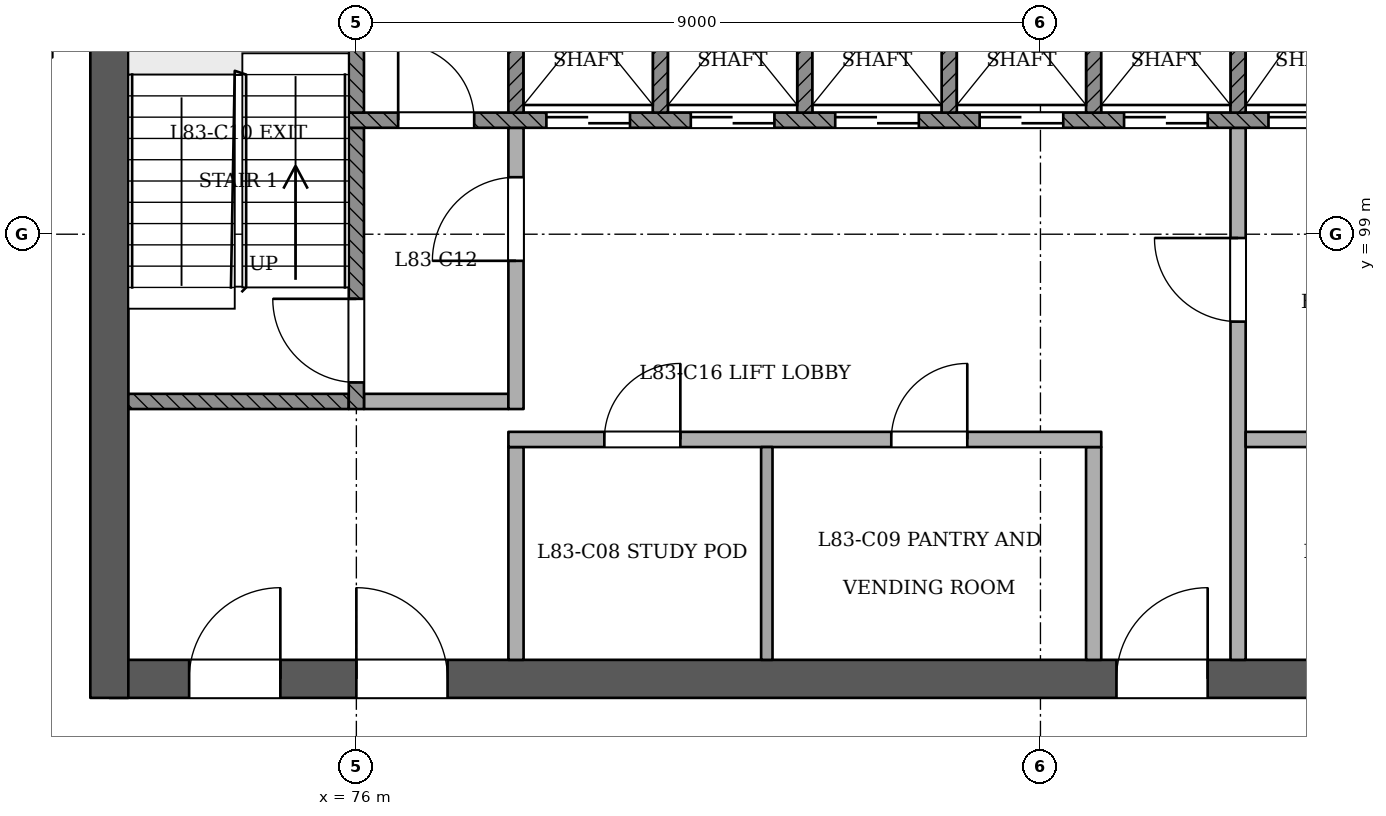
"""IFC4 building model, lengths in metres.
Left out: names, types, materials, properties, quantities, classifications, styles, units other than length and angle.
Written with IfcOpenShell. Run it as: python <this file> out.ifc"""

import sys

from ifc_helpers import new_model, si_unit, direction, frame, frame_2d, origin, place, context, subcontext, project, spatial, rectangle, extrude, element, fill, save


model = new_model("IFC4")
c1 = context("Model", 3, precision=1e-05, world=origin(), true_north=direction((0.0, 1.0)))
c2 = subcontext(c1, "Body", "Model", "MODEL_VIEW")
j1 = project(units=[si_unit("LENGTHUNIT", "METRE"), si_unit("PLANEANGLEUNIT", "RADIAN")], contexts=[c1])
p1 = place(None, origin())
s1 = spatial("IfcSite", under=j1, at=p1, CompositionType="ELEMENT")
p2 = place(p1, origin())
s2 = spatial("IfcBuilding", under=s1, at=p2, CompositionType="ELEMENT")
p3 = place(p2, frame((0.0, 0.0, 320.2)))
s3 = spatial("IfcBuildingStorey", under=s2, at=p3, CompositionType="ELEMENT", Elevation=320.2)
p4 = place(p3, frame((72.75, 93.15, 0.0), z_axis=(0.0, 0.0, 1.0), x_axis=(1.0, 0.0, 0.0)))
e1 = element("IfcWall", 1, at=p4, inside=s3, PredefinedType="SHEAR", context=c2, shape_type="SweptSolid", body=[
    extrude(rectangle(XDim=24.75, YDim=0.5, at=frame_2d((12.375, 0.0))), origin(), (0.0, 0.0, 1.0), 3.6),
])
p5 = place(p4, frame((1.05, 0.0, 0.0)))
e2 = element("IfcOpeningElement", 2, at=p5, cuts=e1, PredefinedType="OPENING", context=c2, shape_type="SweptSolid", body=[
    extrude(rectangle(XDim=1.2, YDim=2.1, at=frame_2d((0.6, 1.05))), frame((0.0, 0.26, 0.0), z_axis=(0.0, -1.0, 0.0), x_axis=(1.0, 0.0, 0.0)), (0.0, 0.0, 1.0), 0.521),
])
p6 = place(p4, frame((3.25, 0.0, 0.0)))
e3 = element("IfcOpeningElement", 3, at=p6, cuts=e1, PredefinedType="OPENING", context=c2, shape_type="SweptSolid", body=[
    extrude(rectangle(XDim=1.2, YDim=2.1, at=frame_2d((0.6, 1.05))), frame((0.0, 0.26, 0.0), z_axis=(0.0, -1.0, 0.0), x_axis=(1.0, 0.0, 0.0)), (0.0, 0.0, 1.0), 0.521),
])
p7 = place(p4, frame((13.25, 0.0, 0.0)))
e4 = element("IfcOpeningElement", 4, at=p7, cuts=e1, PredefinedType="OPENING", context=c2, shape_type="SweptSolid", body=[
    extrude(rectangle(XDim=1.2, YDim=2.1, at=frame_2d((0.6, 1.05))), frame((0.0, 0.26, 0.0), z_axis=(0.0, -1.0, 0.0), x_axis=(1.0, 0.0, 0.0)), (0.0, 0.0, 1.0), 0.521),
])
p8 = place(p4, frame((16.663, 0.0, 0.0)))
e5 = element("IfcOpeningElement", 5, at=p8, cuts=e1, PredefinedType="OPENING", context=c2, shape_type="SweptSolid", body=[
    extrude(rectangle(XDim=1.0, YDim=2.1, at=frame_2d((0.5, 1.05))), frame((0.0, 0.26, 0.0), z_axis=(0.0, -1.0, 0.0), x_axis=(1.0, 0.0, 0.0)), (0.0, 0.0, 1.0), 0.521),
])
p9 = place(p4, frame((20.55, 0.0, 0.0)))
e6 = element("IfcOpeningElement", 6, at=p9, cuts=e1, PredefinedType="OPENING", context=c2, shape_type="SweptSolid", body=[
    extrude(rectangle(XDim=1.0, YDim=2.1, at=frame_2d((0.5, 1.05))), frame((0.0, 0.26, 0.0), z_axis=(0.0, -1.0, 0.0), x_axis=(1.0, 0.0, 0.0)), (0.0, 0.0, 1.0), 0.521),
])
p10 = place(p4, frame((22.988, 0.0, 0.0)))
e7 = element("IfcOpeningElement", 7, at=p10, cuts=e1, PredefinedType="OPENING", context=c2, shape_type="SweptSolid", body=[
    extrude(rectangle(XDim=1.0, YDim=2.1, at=frame_2d((0.5, 1.05))), frame((0.0, 0.26, 0.0), z_axis=(0.0, -1.0, 0.0), x_axis=(1.0, 0.0, 0.0)), (0.0, 0.0, 1.0), 0.521),
])
p11 = place(p3, frame((72.75, 103.65, 0.0), z_axis=(0.0, 0.0, 1.0), x_axis=(0.0, -1.0, 0.0)))
e8 = element("IfcWall", 8, at=p11, inside=s3, PredefinedType="SHEAR", context=c2, shape_type="SweptSolid", body=[
    extrude(rectangle(XDim=10.75, YDim=0.5, at=frame_2d((5.375, 0.0))), origin(), (0.0, 0.0, 1.0), 3.6),
])
p12 = place(p3, frame((78.1, 93.4, 0.0), z_axis=(0.0, 0.0, 1.0), x_axis=(0.0, 1.0, 0.0)))
e9 = element("IfcWall", 9, at=p12, inside=s3, PredefinedType="PARTITIONING", context=c2, shape_type="SweptSolid", body=[
    extrude(rectangle(XDim=2.8, YDim=0.2, at=frame_2d((1.4, 0.0))), origin(), (0.0, 0.0, 1.0), 3.2),
])
p13 = place(p3, frame((81.4, 93.4, 0.0), z_axis=(0.0, 0.0, 1.0), x_axis=(0.0, 1.0, 0.0)))
e10 = element("IfcWall", 10, at=p13, inside=s3, PredefinedType="PARTITIONING", context=c2, shape_type="SweptSolid", body=[
    extrude(rectangle(XDim=2.8, YDim=0.15, at=frame_2d((1.4, 0.0))), origin(), (0.0, 0.0, 1.0), 3.2),
])
p14 = place(p3, frame((85.7, 93.4, 0.0), z_axis=(0.0, 0.0, 1.0), x_axis=(0.0, 1.0, 0.0)))
e11 = element("IfcWall", 11, at=p14, inside=s3, PredefinedType="PARTITIONING", context=c2, shape_type="SweptSolid", body=[
    extrude(rectangle(XDim=2.8, YDim=0.2, at=frame_2d((1.4, 0.0))), origin(), (0.0, 0.0, 1.0), 3.2),
])
p15 = place(p3, frame((87.6, 93.4, 0.0), z_axis=(0.0, 0.0, 1.0), x_axis=(0.0, 1.0, 0.0)))
e12 = element("IfcWall", 12, at=p15, inside=s3, PredefinedType="PARTITIONING", context=c2, shape_type="SweptSolid", body=[
    extrude(rectangle(XDim=7.0, YDim=0.2, at=frame_2d((3.5, 0.0))), origin(), (0.0, 0.0, 1.0), 3.2),
])
p16 = place(p15, frame((4.45, 0.0, 0.0)))
e13 = element("IfcOpeningElement", 13, at=p16, cuts=e12, PredefinedType="OPENING", context=c2, shape_type="SweptSolid", body=[
    extrude(rectangle(XDim=1.1, YDim=2.1, at=frame_2d((0.55, 1.05))), frame((0.0, 0.11, 0.0), z_axis=(0.0, -1.0, 0.0), x_axis=(1.0, 0.0, 0.0)), (0.0, 0.0, 1.0), 0.221),
])
p17 = place(p3, frame((78.0, 96.3, 0.0), z_axis=(0.0, 0.0, 1.0), x_axis=(1.0, 0.0, 0.0)))
e14 = element("IfcWall", 14, at=p17, inside=s3, PredefinedType="PARTITIONING", context=c2, shape_type="SweptSolid", body=[
    extrude(rectangle(XDim=7.8, YDim=0.2, at=frame_2d((3.9, 0.0))), origin(), (0.0, 0.0, 1.0), 3.2),
])
p18 = place(p17, frame((1.262, 0.0, 0.0)))
e15 = element("IfcOpeningElement", 15, at=p18, cuts=e14, PredefinedType="OPENING", context=c2, shape_type="SweptSolid", body=[
    extrude(rectangle(XDim=1.0, YDim=2.1, at=frame_2d((0.5, 1.05))), frame((0.0, 0.11, 0.0), z_axis=(0.0, -1.0, 0.0), x_axis=(1.0, 0.0, 0.0)), (0.0, 0.0, 1.0), 0.221),
])
p19 = place(p17, frame((5.038, 0.0, 0.0)))
e16 = element("IfcOpeningElement", 16, at=p19, cuts=e14, PredefinedType="OPENING", context=c2, shape_type="SweptSolid", body=[
    extrude(rectangle(XDim=1.0, YDim=2.1, at=frame_2d((0.5, 1.05))), frame((0.0, 0.11, 0.0), z_axis=(0.0, -1.0, 0.0), x_axis=(1.0, 0.0, 0.0)), (0.0, 0.0, 1.0), 0.221),
])
p20 = place(p3, frame((87.7, 96.3, 0.0), z_axis=(0.0, 0.0, 1.0), x_axis=(1.0, 0.0, 0.0)))
e17 = element("IfcWall", 17, at=p20, inside=s3, PredefinedType="PARTITIONING", context=c2, shape_type="SweptSolid", body=[
    extrude(rectangle(XDim=3.6, YDim=0.2, at=frame_2d((1.8, 0.0))), origin(), (0.0, 0.0, 1.0), 3.2),
])
p21 = place(p3, frame((73.0, 96.8, 0.0), z_axis=(0.0, 0.0, 1.0), x_axis=(1.0, 0.0, 0.0)))
e18 = element("IfcWall", 18, at=p21, inside=s3, PredefinedType="SOLIDWALL", context=c2, shape_type="SweptSolid", body=[
    extrude(rectangle(XDim=2.9, YDim=0.2, at=frame_2d((1.45, 0.0))), origin(), (0.0, 0.0, 1.0), 3.2),
])
p22 = place(p3, frame((76.0, 96.7, 0.0), z_axis=(0.0, 0.0, 1.0), x_axis=(0.0, 1.0, 0.0)))
e19 = element("IfcWall", 19, at=p22, inside=s3, PredefinedType="SOLIDWALL", context=c2, shape_type="SweptSolid", body=[
    extrude(rectangle(XDim=3.7, YDim=0.2, at=frame_2d((1.85, 0.0))), origin(), (0.0, 0.0, 1.0), 3.2),
])
p23 = place(p22, frame((0.35, 0.0, 0.0)))
e20 = element("IfcOpeningElement", 20, at=p23, cuts=e19, PredefinedType="OPENING", context=c2, shape_type="SweptSolid", body=[
    extrude(rectangle(XDim=1.1, YDim=2.1, at=frame_2d((0.55, 1.05))), frame((0.0, 0.11, 0.0), z_axis=(0.0, -1.0, 0.0), x_axis=(1.0, 0.0, 0.0)), (0.0, 0.0, 1.0), 0.221),
])
p24 = place(p3, frame((76.1, 96.8, 0.0), z_axis=(0.0, 0.0, 1.0), x_axis=(1.0, 0.0, 0.0)))
e21 = element("IfcWall", 21, at=p24, inside=s3, PredefinedType="PARTITIONING", context=c2, shape_type="SweptSolid", body=[
    extrude(rectangle(XDim=1.9, YDim=0.2, at=frame_2d((0.95, 0.0))), origin(), (0.0, 0.0, 1.0), 3.2),
])
p25 = place(p3, frame((78.1, 96.7, 0.0), z_axis=(0.0, 0.0, 1.0), x_axis=(0.0, 1.0, 0.0)))
e22 = element("IfcWall", 22, at=p25, inside=s3, PredefinedType="PARTITIONING", context=c2, shape_type="SweptSolid", body=[
    extrude(rectangle(XDim=3.7, YDim=0.2, at=frame_2d((1.85, 0.0))), origin(), (0.0, 0.0, 1.0), 3.2),
])
p26 = place(p25, frame((1.95, 0.0, 0.0)))
e23 = element("IfcOpeningElement", 23, at=p26, cuts=e22, PredefinedType="OPENING", context=c2, shape_type="SweptSolid", body=[
    extrude(rectangle(XDim=1.1, YDim=2.1, at=frame_2d((0.55, 1.05))), frame((0.0, 0.11, 0.0), z_axis=(0.0, -1.0, 0.0), x_axis=(1.0, 0.0, 0.0)), (0.0, 0.0, 1.0), 0.221),
])
p27 = place(p3, frame((75.9, 100.5, 0.0), z_axis=(0.0, 0.0, 1.0), x_axis=(1.0, 0.0, 0.0)))
e24 = element("IfcWall", 24, at=p27, inside=s3, PredefinedType="SOLIDWALL", context=c2, shape_type="SweptSolid", body=[
    extrude(rectangle(XDim=18.2, YDim=0.2, at=frame_2d((9.1, 0.0))), origin(), (0.0, 0.0, 1.0), 3.2),
])
p28 = place(p27, frame((2.6, 0.0, 0.0)))
e25 = element("IfcOpeningElement", 25, at=p28, cuts=e24, PredefinedType="OPENING", context=c2, shape_type="SweptSolid", body=[
    extrude(rectangle(XDim=1.1, YDim=2.1, at=frame_2d((0.55, 1.05))), frame((0.0, 0.11, 0.0), z_axis=(0.0, -1.0, 0.0), x_axis=(1.0, 0.0, 0.0)), (0.0, 0.0, 1.0), 0.221),
])
p29 = place(p27, frame((4.5, 0.0, 0.0)))
e26 = element("IfcOpeningElement", 26, at=p29, cuts=e24, PredefinedType="OPENING", context=c2, shape_type="SweptSolid", body=[
    extrude(rectangle(XDim=1.1, YDim=2.1, at=frame_2d((0.55, 1.05))), frame((0.0, 0.11, 0.0), z_axis=(0.0, -1.0, 0.0), x_axis=(1.0, 0.0, 0.0)), (0.0, 0.0, 1.0), 0.221),
])
p30 = place(p27, frame((6.4, 0.0, 0.0)))
e27 = element("IfcOpeningElement", 27, at=p30, cuts=e24, PredefinedType="OPENING", context=c2, shape_type="SweptSolid", body=[
    extrude(rectangle(XDim=1.1, YDim=2.1, at=frame_2d((0.55, 1.05))), frame((0.0, 0.11, 0.0), z_axis=(0.0, -1.0, 0.0), x_axis=(1.0, 0.0, 0.0)), (0.0, 0.0, 1.0), 0.221),
])
p31 = place(p27, frame((8.3, 0.0, 0.0)))
e28 = element("IfcOpeningElement", 28, at=p31, cuts=e24, PredefinedType="OPENING", context=c2, shape_type="SweptSolid", body=[
    extrude(rectangle(XDim=1.1, YDim=2.1, at=frame_2d((0.55, 1.05))), frame((0.0, 0.11, 0.0), z_axis=(0.0, -1.0, 0.0), x_axis=(1.0, 0.0, 0.0)), (0.0, 0.0, 1.0), 0.221),
])
p32 = place(p27, frame((10.2, 0.0, 0.0)))
e29 = element("IfcOpeningElement", 29, at=p32, cuts=e24, PredefinedType="OPENING", context=c2, shape_type="SweptSolid", body=[
    extrude(rectangle(XDim=1.1, YDim=2.1, at=frame_2d((0.55, 1.05))), frame((0.0, 0.11, 0.0), z_axis=(0.0, -1.0, 0.0), x_axis=(1.0, 0.0, 0.0)), (0.0, 0.0, 1.0), 0.221),
])
p33 = place(p27, frame((12.1, 0.0, 0.0)))
e30 = element("IfcOpeningElement", 30, at=p33, cuts=e24, PredefinedType="OPENING", context=c2, shape_type="SweptSolid", body=[
    extrude(rectangle(XDim=1.1, YDim=2.1, at=frame_2d((0.55, 1.05))), frame((0.0, 0.11, 0.0), z_axis=(0.0, -1.0, 0.0), x_axis=(1.0, 0.0, 0.0)), (0.0, 0.0, 1.0), 0.221),
])
p34 = place(p27, frame((14.0, 0.0, 0.0)))
e31 = element("IfcOpeningElement", 31, at=p34, cuts=e24, PredefinedType="OPENING", context=c2, shape_type="SweptSolid", body=[
    extrude(rectangle(XDim=1.1, YDim=2.1, at=frame_2d((0.55, 1.05))), frame((0.0, 0.11, 0.0), z_axis=(0.0, -1.0, 0.0), x_axis=(1.0, 0.0, 0.0)), (0.0, 0.0, 1.0), 0.221),
])
p35 = place(p27, frame((0.65, 0.0, 0.0)))
e32 = element("IfcOpeningElement", 32, at=p35, cuts=e24, PredefinedType="OPENING", context=c2, shape_type="SweptSolid", body=[
    extrude(rectangle(XDim=1.0, YDim=2.1, at=frame_2d((0.5, 1.05))), frame((0.0, 0.11, 0.0), z_axis=(0.0, -1.0, 0.0), x_axis=(1.0, 0.0, 0.0)), (0.0, 0.0, 1.0), 0.221),
])
p36 = place(p27, frame((16.3, 0.0, 0.0)))
e33 = element("IfcOpeningElement", 33, at=p36, cuts=e24, PredefinedType="OPENING", context=c2, shape_type="SweptSolid", body=[
    extrude(rectangle(XDim=1.0, YDim=2.1, at=frame_2d((0.5, 1.05))), frame((0.0, 0.11, 0.0), z_axis=(0.0, -1.0, 0.0), x_axis=(1.0, 0.0, 0.0)), (0.0, 0.0, 1.0), 0.221),
])
for number, where, z_axis, x_axis in (
    (34, (76.0, 100.6, 0.0), (0.0, 0.0, 1.0), (0.0, 1.0, 0.0)),
    (35, (78.1, 100.6, 0.0), (0.0, 0.0, 1.0), (0.0, 1.0, 0.0)),
    (36, (80.0, 100.6, 0.0), (0.0, 0.0, 1.0), (0.0, 1.0, 0.0)),
    (37, (81.9, 100.6, 0.0), (0.0, 0.0, 1.0), (0.0, 1.0, 0.0)),
    (38, (83.8, 100.6, 0.0), (0.0, 0.0, 1.0), (0.0, 1.0, 0.0)),
    (39, (85.7, 100.6, 0.0), (0.0, 0.0, 1.0), (0.0, 1.0, 0.0)),
    (40, (87.6, 100.6, 0.0), (0.0, 0.0, 1.0), (0.0, 1.0, 0.0)),
):
    element("IfcWall", number, at=place(p3, frame(where, z_axis=z_axis, x_axis=x_axis)), inside=s3, PredefinedType="SOLIDWALL", context=c2, shape_type="SweptSolid", body=[
        extrude(rectangle(XDim=2.8, YDim=0.2, at=frame_2d((1.4, 0.0))), origin(), (0.0, 0.0, 1.0), 3.2),
    ])
p37 = place(p28, origin())
e41 = element("IfcDoor", 41, at=p37, inside=s3, OperationType="SLIDING_TO_RIGHT", PredefinedType="NOTDEFINED", context=c2, shape_type="SweptSolid", body=[
    extrude(rectangle(XDim=1.1, YDim=2.1, at=frame_2d((0.55, 1.05))), frame((0.0, 0.025, 0.0), z_axis=(0.0, -1.0, 0.0), x_axis=(1.0, 0.0, 0.0)), (0.0, 0.0, 1.0), 0.05),
])
fill(e25, e41)
p38 = place(p29, origin())
e42 = element("IfcDoor", 42, at=p38, inside=s3, OperationType="SLIDING_TO_LEFT", PredefinedType="NOTDEFINED", context=c2, shape_type="SweptSolid", body=[
    extrude(rectangle(XDim=1.1, YDim=2.1, at=frame_2d((0.55, 1.05))), frame((0.0, 0.025, 0.0), z_axis=(0.0, -1.0, 0.0), x_axis=(1.0, 0.0, 0.0)), (0.0, 0.0, 1.0), 0.05),
])
fill(e26, e42)
p39 = place(p30, origin())
e43 = element("IfcDoor", 43, at=p39, inside=s3, OperationType="SLIDING_TO_RIGHT", PredefinedType="NOTDEFINED", context=c2, shape_type="SweptSolid", body=[
    extrude(rectangle(XDim=1.1, YDim=2.1, at=frame_2d((0.55, 1.05))), frame((0.0, 0.025, 0.0), z_axis=(0.0, -1.0, 0.0), x_axis=(1.0, 0.0, 0.0)), (0.0, 0.0, 1.0), 0.05),
])
fill(e27, e43)
p40 = place(p31, origin())
e44 = element("IfcDoor", 44, at=p40, inside=s3, OperationType="SLIDING_TO_LEFT", PredefinedType="NOTDEFINED", context=c2, shape_type="SweptSolid", body=[
    extrude(rectangle(XDim=1.1, YDim=2.1, at=frame_2d((0.55, 1.05))), frame((0.0, 0.025, 0.0), z_axis=(0.0, -1.0, 0.0), x_axis=(1.0, 0.0, 0.0)), (0.0, 0.0, 1.0), 0.05),
])
fill(e28, e44)
p41 = place(p32, origin())
e45 = element("IfcDoor", 45, at=p41, inside=s3, OperationType="SLIDING_TO_RIGHT", PredefinedType="NOTDEFINED", context=c2, shape_type="SweptSolid", body=[
    extrude(rectangle(XDim=1.1, YDim=2.1, at=frame_2d((0.55, 1.05))), frame((0.0, 0.025, 0.0), z_axis=(0.0, -1.0, 0.0), x_axis=(1.0, 0.0, 0.0)), (0.0, 0.0, 1.0), 0.05),
])
fill(e29, e45)
p42 = place(p33, origin())
e46 = element("IfcDoor", 46, at=p42, inside=s3, OperationType="SLIDING_TO_RIGHT", PredefinedType="NOTDEFINED", context=c2, shape_type="SweptSolid", body=[
    extrude(rectangle(XDim=1.1, YDim=2.1, at=frame_2d((0.55, 1.05))), frame((0.0, 0.025, 0.0), z_axis=(0.0, -1.0, 0.0), x_axis=(1.0, 0.0, 0.0)), (0.0, 0.0, 1.0), 0.05),
])
fill(e30, e46)
p43 = place(p23, origin())
e47 = element("IfcDoor", 47, at=p43, inside=s3, OperationType="SINGLE_SWING_RIGHT", PredefinedType="NOTDEFINED", context=c2, shape_type="SweptSolid", body=[
    extrude(rectangle(XDim=1.1, YDim=2.1, at=frame_2d((0.55, 1.05))), frame((0.0, 0.025, 0.0), z_axis=(0.0, -1.0, 0.0), x_axis=(1.0, 0.0, 0.0)), (0.0, 0.0, 1.0), 0.05),
])
fill(e20, e47)
p44 = place(p26, origin())
e48 = element("IfcDoor", 48, at=p44, inside=s3, OperationType="SINGLE_SWING_LEFT", PredefinedType="NOTDEFINED", context=c2, shape_type="SweptSolid", body=[
    extrude(rectangle(XDim=1.1, YDim=2.1, at=frame_2d((0.55, 1.05))), frame((0.0, 0.025, 0.0), z_axis=(0.0, -1.0, 0.0), x_axis=(1.0, 0.0, 0.0)), (0.0, 0.0, 1.0), 0.05),
])
fill(e23, e48)
p45 = place(p16, origin())
e49 = element("IfcDoor", 49, at=p45, inside=s3, OperationType="SINGLE_SWING_RIGHT", PredefinedType="NOTDEFINED", context=c2, shape_type="SweptSolid", body=[
    extrude(rectangle(XDim=1.1, YDim=2.1, at=frame_2d((0.55, 1.05))), frame((0.0, 0.025, 0.0), z_axis=(0.0, -1.0, 0.0), x_axis=(1.0, 0.0, 0.0)), (0.0, 0.0, 1.0), 0.05),
])
fill(e13, e49)
p46 = place(p5, origin())
e50 = element("IfcDoor", 50, at=p46, inside=s3, OperationType="SINGLE_SWING_RIGHT", PredefinedType="NOTDEFINED", context=c2, shape_type="SweptSolid", body=[
    extrude(rectangle(XDim=1.2, YDim=2.1, at=frame_2d((0.6, 1.05))), frame((0.0, 0.025, 0.0), z_axis=(0.0, -1.0, 0.0), x_axis=(1.0, 0.0, 0.0)), (0.0, 0.0, 1.0), 0.05),
])
fill(e2, e50)
p47 = place(p6, origin())
e51 = element("IfcDoor", 51, at=p47, inside=s3, OperationType="SINGLE_SWING_LEFT", PredefinedType="NOTDEFINED", context=c2, shape_type="SweptSolid", body=[
    extrude(rectangle(XDim=1.2, YDim=2.1, at=frame_2d((0.6, 1.05))), frame((0.0, 0.025, 0.0), z_axis=(0.0, -1.0, 0.0), x_axis=(1.0, 0.0, 0.0)), (0.0, 0.0, 1.0), 0.05),
])
fill(e3, e51)
p48 = place(p7, origin())
e52 = element("IfcDoor", 52, at=p48, inside=s3, OperationType="SINGLE_SWING_RIGHT", PredefinedType="NOTDEFINED", context=c2, shape_type="SweptSolid", body=[
    extrude(rectangle(XDim=1.2, YDim=2.1, at=frame_2d((0.6, 1.05))), frame((0.0, 0.025, 0.0), z_axis=(0.0, -1.0, 0.0), x_axis=(1.0, 0.0, 0.0)), (0.0, 0.0, 1.0), 0.05),
])
fill(e4, e52)
p49 = place(p35, origin())
e53 = element("IfcDoor", 53, at=p49, inside=s3, OperationType="SINGLE_SWING_LEFT", PredefinedType="NOTDEFINED", context=c2, shape_type="SweptSolid", body=[
    extrude(rectangle(XDim=1.0, YDim=2.1, at=frame_2d((0.5, 1.05))), frame((0.0, 0.025, 0.0), z_axis=(0.0, -1.0, 0.0), x_axis=(1.0, 0.0, 0.0)), (0.0, 0.0, 1.0), 0.05),
])
fill(e32, e53)
p50 = place(p18, origin())
e54 = element("IfcDoor", 54, at=p50, inside=s3, OperationType="SINGLE_SWING_RIGHT", PredefinedType="NOTDEFINED", context=c2, shape_type="SweptSolid", body=[
    extrude(rectangle(XDim=1.0, YDim=2.1, at=frame_2d((0.5, 1.05))), frame((0.0, 0.025, 0.0), z_axis=(0.0, -1.0, 0.0), x_axis=(1.0, 0.0, 0.0)), (0.0, 0.0, 1.0), 0.05),
])
fill(e15, e54)
p51 = place(p19, origin())
e55 = element("IfcDoor", 55, at=p51, inside=s3, OperationType="SINGLE_SWING_RIGHT", PredefinedType="NOTDEFINED", context=c2, shape_type="SweptSolid", body=[
    extrude(rectangle(XDim=1.0, YDim=2.1, at=frame_2d((0.5, 1.05))), frame((0.0, 0.025, 0.0), z_axis=(0.0, -1.0, 0.0), x_axis=(1.0, 0.0, 0.0)), (0.0, 0.0, 1.0), 0.05),
])
fill(e16, e55)
save(model, sys.argv[1])
